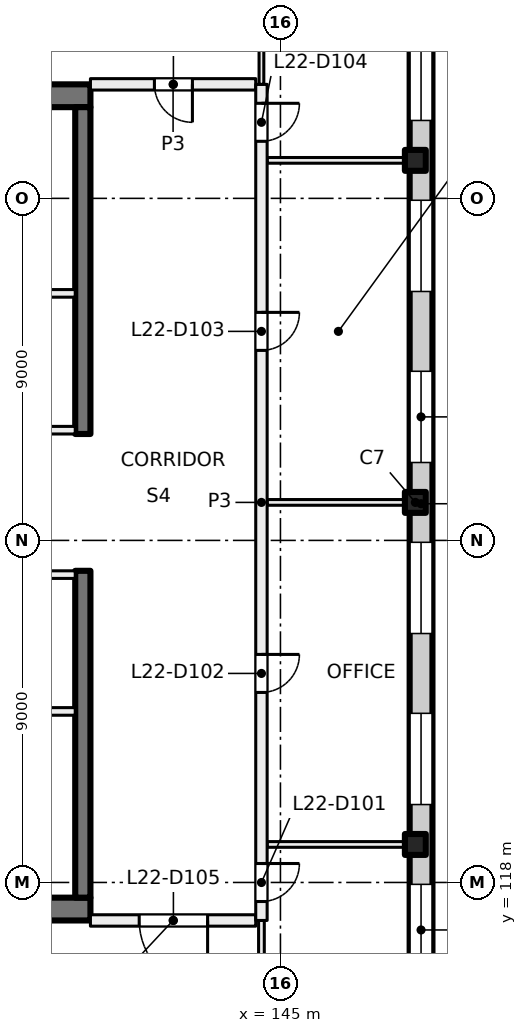
"""IFC4 building model, lengths in metres.
Left out: names, types, materials, properties, quantities, classifications, styles, units other than length and angle.
Written with IfcOpenShell. Run it as: python <this file> out.ifc"""

import sys

from ifc_helpers import new_model, si_unit, direction, frame, frame_2d, origin, origin_2d, place, context, subcontext, project, spatial, rectangle, extrude, element, fill, save


model = new_model("IFC4")
c1 = context("Model", 3, precision=1e-05, world=origin(), true_north=direction((0.0, 1.0)))
c2 = subcontext(c1, "Body", "Model", "MODEL_VIEW")
j1 = project(units=[si_unit("LENGTHUNIT", "METRE"), si_unit("PLANEANGLEUNIT", "RADIAN")], contexts=[c1])
p1 = place(None, origin())
s1 = spatial("IfcSite", under=j1, at=p1, CompositionType="ELEMENT")
p2 = place(p1, origin())
s2 = spatial("IfcBuilding", under=s1, at=p2, CompositionType="ELEMENT")
p3 = place(p2, frame((0.0, 0.0, 97.0)))
s3 = spatial("IfcBuildingStorey", under=s2, at=p3, CompositionType="ELEMENT", Elevation=97.0)
for number, where, z_axis, x_axis in (
    (1, (148.55, 119.0, 0.0), (0.0, 0.0, 1.0), (1.0, 0.0, 0.0)),
    (2, (148.55, 128.0, 0.0), (0.0, 0.0, 1.0), (1.0, 0.0, 0.0)),
    (3, (148.55, 137.0, 0.0), (0.0, 0.0, 1.0), (1.0, 0.0, 0.0)),
):
    element("IfcColumn", number, at=place(p3, frame(where, z_axis=z_axis, x_axis=x_axis)), inside=s3, PredefinedType="COLUMN", context=c2, shape_type="SweptSolid", body=[
        extrude(rectangle(XDim=0.55, YDim=0.55, at=origin_2d()), origin(), (0.0, 0.0, 1.0), 4.0),
    ])
for number, where, z_axis, x_axis in (
    (4, (135.4, 117.3, 0.0), (0.0, 0.0, 1.0), (1.0, 0.0, 0.0)),
    (5, (135.4, 138.7, 0.0), (0.0, 0.0, 1.0), (1.0, 0.0, 0.0)),
):
    element("IfcWall", number, at=place(p3, frame(where, z_axis=z_axis, x_axis=x_axis)), inside=s3, PredefinedType="SHEAR", context=c2, shape_type="SweptSolid", body=[
        extrude(rectangle(XDim=4.6, YDim=0.6, at=frame_2d((2.3, 0.0))), origin(), (0.0, 0.0, 1.0), 4.0),
    ])
for number, where, z_axis, x_axis in (
    (6, (139.8, 117.6, 0.0), (0.0, 0.0, 1.0), (0.0, 1.0, 0.0)),
    (7, (139.8, 129.8, 0.0), (0.0, 0.0, 1.0), (0.0, 1.0, 0.0)),
):
    element("IfcWall", number, at=place(p3, frame(where, z_axis=z_axis, x_axis=x_axis)), inside=s3, PredefinedType="SHEAR", context=c2, shape_type="SweptSolid", body=[
        extrude(rectangle(XDim=8.6, YDim=0.4, at=frame_2d((4.3, 0.0))), origin(), (0.0, 0.0, 1.0), 4.0),
    ])
p4 = place(p3, frame((148.7, 141.93, 0.0), z_axis=(0.0, 0.0, 1.0), x_axis=(0.0, -1.0, 0.0)))
e8 = element("IfcWall", 8, at=p4, inside=s3, PredefinedType="SOLIDWALL", context=c2, shape_type="SweptSolid", body=[
    extrude(rectangle(XDim=27.93, YDim=0.6, at=frame_2d((13.965, 0.0))), origin(), (0.0, 0.0, 1.0), 3.625),
])
p5 = place(p4, frame((1.48, 0.0, 0.9)))
e9 = element("IfcOpeningElement", 9, at=p5, cuts=e8, PredefinedType="OPENING", context=c2, shape_type="SweptSolid", body=[
    extrude(rectangle(XDim=2.4, YDim=2.4, at=frame_2d((1.2, 1.2))), frame((0.0, 0.31, 0.0), z_axis=(0.0, -1.0, 0.0), x_axis=(1.0, 0.0, 0.0)), (0.0, 0.0, 1.0), 0.62),
])
p6 = place(p4, frame((5.98, 0.0, 0.9)))
e10 = element("IfcOpeningElement", 10, at=p6, cuts=e8, PredefinedType="OPENING", context=c2, shape_type="SweptSolid", body=[
    extrude(rectangle(XDim=2.4, YDim=2.4, at=frame_2d((1.2, 1.2))), frame((0.0, 0.31, 0.0), z_axis=(0.0, -1.0, 0.0), x_axis=(1.0, 0.0, 0.0)), (0.0, 0.0, 1.0), 0.62),
])
p7 = place(p4, frame((10.48, 0.0, 0.9)))
e11 = element("IfcOpeningElement", 11, at=p7, cuts=e8, PredefinedType="OPENING", context=c2, shape_type="SweptSolid", body=[
    extrude(rectangle(XDim=2.4, YDim=2.4, at=frame_2d((1.2, 1.2))), frame((0.0, 0.31, 0.0), z_axis=(0.0, -1.0, 0.0), x_axis=(1.0, 0.0, 0.0)), (0.0, 0.0, 1.0), 0.62),
])
p8 = place(p4, frame((14.98, 0.0, 0.9)))
e12 = element("IfcOpeningElement", 12, at=p8, cuts=e8, PredefinedType="OPENING", context=c2, shape_type="SweptSolid", body=[
    extrude(rectangle(XDim=2.4, YDim=2.4, at=frame_2d((1.2, 1.2))), frame((0.0, 0.31, 0.0), z_axis=(0.0, -1.0, 0.0), x_axis=(1.0, 0.0, 0.0)), (0.0, 0.0, 1.0), 0.62),
])
p9 = place(p4, frame((19.48, 0.0, 0.9)))
e13 = element("IfcOpeningElement", 13, at=p9, cuts=e8, PredefinedType="OPENING", context=c2, shape_type="SweptSolid", body=[
    extrude(rectangle(XDim=2.4, YDim=2.4, at=frame_2d((1.2, 1.2))), frame((0.0, 0.31, 0.0), z_axis=(0.0, -1.0, 0.0), x_axis=(1.0, 0.0, 0.0)), (0.0, 0.0, 1.0), 0.62),
])
p10 = place(p4, frame((23.98, 0.0, 0.9)))
e14 = element("IfcOpeningElement", 14, at=p10, cuts=e8, PredefinedType="OPENING", context=c2, shape_type="SweptSolid", body=[
    extrude(rectangle(XDim=2.4, YDim=2.4, at=frame_2d((1.2, 1.2))), frame((0.0, 0.31, 0.0), z_axis=(0.0, -1.0, 0.0), x_axis=(1.0, 0.0, 0.0)), (0.0, 0.0, 1.0), 0.62),
])
p11 = place(p3, frame((135.0, 129.9, 0.0), z_axis=(0.0, 0.0, 1.0), x_axis=(1.0, 0.0, 0.0)))
e15 = element("IfcWall", 15, at=p11, inside=s3, PredefinedType="PARTITIONING", context=c2, shape_type="SweptSolid", body=[
    extrude(rectangle(XDim=4.6, YDim=0.2, at=frame_2d((2.3, 0.0))), origin(), (0.0, 0.0, 1.0), 3.625),
])
p12 = place(p11, frame((1.7, 0.0, 0.0)))
e16 = element("IfcOpeningElement", 16, at=p12, cuts=e15, PredefinedType="OPENING", context=c2, shape_type="SweptSolid", body=[
    extrude(rectangle(XDim=1.2, YDim=2.1, at=frame_2d((0.6, 1.05))), frame((0.0, 0.11, 0.0), z_axis=(0.0, -1.0, 0.0), x_axis=(1.0, 0.0, 0.0)), (0.0, 0.0, 1.0), 0.22),
])
p13 = place(p3, frame((135.0, 133.5, 0.0), z_axis=(0.0, 0.0, 1.0), x_axis=(1.0, 0.0, 0.0)))
e17 = element("IfcWall", 17, at=p13, inside=s3, PredefinedType="PARTITIONING", context=c2, shape_type="SweptSolid", body=[
    extrude(rectangle(XDim=4.6, YDim=0.2, at=frame_2d((2.3, 0.0))), origin(), (0.0, 0.0, 1.0), 3.625),
])
p14 = place(p13, frame((1.75, 0.0, 0.0)))
e18 = element("IfcOpeningElement", 18, at=p14, cuts=e17, PredefinedType="OPENING", context=c2, shape_type="SweptSolid", body=[
    extrude(rectangle(XDim=1.5, YDim=2.1, at=frame_2d((0.75, 1.05))), frame((0.0, 0.11, 0.0), z_axis=(0.0, -1.0, 0.0), x_axis=(1.0, 0.0, 0.0)), (0.0, 0.0, 1.0), 0.22),
])
p15 = place(p3, frame((139.6, 126.1, 0.0), z_axis=(0.0, 0.0, 1.0), x_axis=(-1.0, 0.0, 0.0)))
e19 = element("IfcWall", 19, at=p15, inside=s3, PredefinedType="PARTITIONING", context=c2, shape_type="SweptSolid", body=[
    extrude(rectangle(XDim=4.6, YDim=0.2, at=frame_2d((2.3, 0.0))), origin(), (0.0, 0.0, 1.0), 3.625),
])
p16 = place(p15, frame((1.7, 0.0, 0.0)))
e20 = element("IfcOpeningElement", 20, at=p16, cuts=e19, PredefinedType="OPENING", context=c2, shape_type="SweptSolid", body=[
    extrude(rectangle(XDim=1.2, YDim=2.1, at=frame_2d((0.6, 1.05))), frame((0.0, 0.11, 0.0), z_axis=(0.0, -1.0, 0.0), x_axis=(1.0, 0.0, 0.0)), (0.0, 0.0, 1.0), 0.22),
])
p17 = place(p3, frame((139.6, 122.5, 0.0), z_axis=(0.0, 0.0, 1.0), x_axis=(-1.0, 0.0, 0.0)))
e21 = element("IfcWall", 21, at=p17, inside=s3, PredefinedType="PARTITIONING", context=c2, shape_type="SweptSolid", body=[
    extrude(rectangle(XDim=4.6, YDim=0.2, at=frame_2d((2.3, 0.0))), origin(), (0.0, 0.0, 1.0), 3.625),
])
p18 = place(p17, frame((1.35, 0.0, 0.0)))
e22 = element("IfcOpeningElement", 22, at=p18, cuts=e21, PredefinedType="OPENING", context=c2, shape_type="SweptSolid", body=[
    extrude(rectangle(XDim=1.5, YDim=2.1, at=frame_2d((0.75, 1.05))), frame((0.0, 0.11, 0.0), z_axis=(0.0, -1.0, 0.0), x_axis=(1.0, 0.0, 0.0)), (0.0, 0.0, 1.0), 0.22),
])
p19 = place(p3, frame((144.35, 139.0, 0.0), z_axis=(0.0, 0.0, 1.0), x_axis=(-1.0, 0.0, 0.0)))
e23 = element("IfcWall", 23, at=p19, inside=s3, PredefinedType="PARTITIONING", context=c2, shape_type="SweptSolid", body=[
    extrude(rectangle(XDim=4.35, YDim=0.3, at=frame_2d((2.175, 0.0))), origin(), (0.0, 0.0, 1.0), 3.625),
])
p20 = place(p19, frame((1.667, 0.0, 0.0)))
e24 = element("IfcOpeningElement", 24, at=p20, cuts=e23, PredefinedType="OPENING", context=c2, shape_type="SweptSolid", body=[
    extrude(rectangle(XDim=1.0, YDim=2.1, at=frame_2d((0.5, 1.05))), frame((0.0, 0.16, 0.0), z_axis=(0.0, -1.0, 0.0), x_axis=(1.0, 0.0, 0.0)), (0.0, 0.0, 1.0), 0.32),
])
p21 = place(p3, frame((144.35, 117.0, 0.0), z_axis=(0.0, 0.0, 1.0), x_axis=(-1.0, 0.0, 0.0)))
e25 = element("IfcWall", 25, at=p21, inside=s3, PredefinedType="PARTITIONING", context=c2, shape_type="SweptSolid", body=[
    extrude(rectangle(XDim=4.35, YDim=0.3, at=frame_2d((2.175, 0.0))), origin(), (0.0, 0.0, 1.0), 3.625),
])
p22 = place(p21, frame((1.267, 0.0, 0.0)))
e26 = element("IfcOpeningElement", 26, at=p22, cuts=e25, PredefinedType="OPENING", context=c2, shape_type="SweptSolid", body=[
    extrude(rectangle(XDim=1.8, YDim=2.1, at=frame_2d((0.9, 1.05))), frame((0.0, 0.16, 0.0), z_axis=(0.0, -1.0, 0.0), x_axis=(1.0, 0.0, 0.0)), (0.0, 0.0, 1.0), 0.32),
])
p23 = place(p3, frame((144.5, 117.0, 0.0), z_axis=(0.0, 0.0, 1.0), x_axis=(0.0, -1.0, 0.0)))
e27 = element("IfcWall", 27, at=p23, inside=s3, PredefinedType="PARTITIONING", context=c2, shape_type="SweptSolid", body=[
    extrude(rectangle(XDim=6.4, YDim=0.15, at=frame_2d((3.2, 0.0))), origin(), (0.0, 0.0, 1.0), 3.625),
])
for number, where, z_axis, x_axis in (
    (28, (144.65, 119.0, 0.0), (0.0, 0.0, 1.0), (1.0, 0.0, 0.0)),
    (29, (144.65, 128.0, 0.0), (0.0, 0.0, 1.0), (1.0, 0.0, 0.0)),
    (30, (144.65, 137.0, 0.0), (0.0, 0.0, 1.0), (1.0, 0.0, 0.0)),
):
    element("IfcWall", number, at=place(p3, frame(where, z_axis=z_axis, x_axis=x_axis)), inside=s3, PredefinedType="PARTITIONING", context=c2, shape_type="SweptSolid", body=[
        extrude(rectangle(XDim=3.75, YDim=0.15, at=frame_2d((1.875, 0.0))), origin(), (0.0, 0.0, 1.0), 3.625),
    ])
p24 = place(p3, frame((144.5, 139.0, 0.0), z_axis=(0.0, 0.0, 1.0), x_axis=(0.0, -1.0, 0.0)))
e31 = element("IfcWall", 31, at=p24, inside=s3, PredefinedType="PARTITIONING", context=c2, shape_type="SweptSolid", body=[
    extrude(rectangle(XDim=22.0, YDim=0.3, at=frame_2d((11.0, 0.0))), origin(), (0.0, 0.0, 1.0), 3.625),
])
p25 = place(p24, frame((20.501, 0.0, 0.0)))
e32 = element("IfcOpeningElement", 32, at=p25, cuts=e31, PredefinedType="OPENING", context=c2, shape_type="SweptSolid", body=[
    extrude(rectangle(XDim=1.0, YDim=2.1, at=frame_2d((0.5, 1.05))), frame((0.0, 0.16, 0.0), z_axis=(0.0, -1.0, 0.0), x_axis=(1.0, 0.0, 0.0)), (0.0, 0.0, 1.0), 0.32),
])
p26 = place(p24, frame((15.0, 0.0, 0.0)))
e33 = element("IfcOpeningElement", 33, at=p26, cuts=e31, PredefinedType="OPENING", context=c2, shape_type="SweptSolid", body=[
    extrude(rectangle(XDim=1.0, YDim=2.1, at=frame_2d((0.5, 1.05))), frame((0.0, 0.16, 0.0), z_axis=(0.0, -1.0, 0.0), x_axis=(1.0, 0.0, 0.0)), (0.0, 0.0, 1.0), 0.32),
])
p27 = place(p24, frame((6.0, 0.0, 0.0)))
e34 = element("IfcOpeningElement", 34, at=p27, cuts=e31, PredefinedType="OPENING", context=c2, shape_type="SweptSolid", body=[
    extrude(rectangle(XDim=1.0, YDim=2.1, at=frame_2d((0.5, 1.05))), frame((0.0, 0.16, 0.0), z_axis=(0.0, -1.0, 0.0), x_axis=(1.0, 0.0, 0.0)), (0.0, 0.0, 1.0), 0.32),
])
p28 = place(p24, frame((0.499, 0.0, 0.0)))
e35 = element("IfcOpeningElement", 35, at=p28, cuts=e31, PredefinedType="OPENING", context=c2, shape_type="SweptSolid", body=[
    extrude(rectangle(XDim=1.0, YDim=2.1, at=frame_2d((0.5, 1.05))), frame((0.0, 0.16, 0.0), z_axis=(0.0, -1.0, 0.0), x_axis=(1.0, 0.0, 0.0)), (0.0, 0.0, 1.0), 0.32),
])
p29 = place(p3, frame((144.5, 141.8, 0.0), z_axis=(0.0, 0.0, 1.0), x_axis=(0.0, -1.0, 0.0)))
e36 = element("IfcWall", 36, at=p29, inside=s3, PredefinedType="PARTITIONING", context=c2, shape_type="SweptSolid", body=[
    extrude(rectangle(XDim=2.8, YDim=0.125, at=frame_2d((1.4, 0.0))), origin(), (0.0, 0.0, 1.0), 3.625),
])
p30 = place(p5, origin())
e37 = element("IfcWindow", 37, at=p30, inside=s3, PartitioningType="SINGLE_PANEL", PredefinedType="WINDOW", context=c2, shape_type="SweptSolid", body=[
    extrude(rectangle(XDim=2.4, YDim=2.4, at=frame_2d((1.2, 1.2))), frame((0.0, 0.03, 0.0), z_axis=(0.0, -1.0, 0.0), x_axis=(1.0, 0.0, 0.0)), (0.0, 0.0, 1.0), 0.06),
])
fill(e9, e37)
p31 = place(p6, origin())
e38 = element("IfcWindow", 38, at=p31, inside=s3, PartitioningType="SINGLE_PANEL", PredefinedType="WINDOW", context=c2, shape_type="SweptSolid", body=[
    extrude(rectangle(XDim=2.4, YDim=2.4, at=frame_2d((1.2, 1.2))), frame((0.0, 0.03, 0.0), z_axis=(0.0, -1.0, 0.0), x_axis=(1.0, 0.0, 0.0)), (0.0, 0.0, 1.0), 0.06),
])
fill(e10, e38)
p32 = place(p7, origin())
e39 = element("IfcWindow", 39, at=p32, inside=s3, PartitioningType="SINGLE_PANEL", PredefinedType="WINDOW", context=c2, shape_type="SweptSolid", body=[
    extrude(rectangle(XDim=2.4, YDim=2.4, at=frame_2d((1.2, 1.2))), frame((0.0, 0.03, 0.0), z_axis=(0.0, -1.0, 0.0), x_axis=(1.0, 0.0, 0.0)), (0.0, 0.0, 1.0), 0.06),
])
fill(e11, e39)
p33 = place(p8, origin())
e40 = element("IfcWindow", 40, at=p33, inside=s3, PartitioningType="SINGLE_PANEL", PredefinedType="WINDOW", context=c2, shape_type="SweptSolid", body=[
    extrude(rectangle(XDim=2.4, YDim=2.4, at=frame_2d((1.2, 1.2))), frame((0.0, 0.03, 0.0), z_axis=(0.0, -1.0, 0.0), x_axis=(1.0, 0.0, 0.0)), (0.0, 0.0, 1.0), 0.06),
])
fill(e12, e40)
p34 = place(p9, origin())
e41 = element("IfcWindow", 41, at=p34, inside=s3, PartitioningType="SINGLE_PANEL", PredefinedType="WINDOW", context=c2, shape_type="SweptSolid", body=[
    extrude(rectangle(XDim=2.4, YDim=2.4, at=frame_2d((1.2, 1.2))), frame((0.0, 0.03, 0.0), z_axis=(0.0, -1.0, 0.0), x_axis=(1.0, 0.0, 0.0)), (0.0, 0.0, 1.0), 0.06),
])
fill(e13, e41)
p35 = place(p10, origin())
e42 = element("IfcWindow", 42, at=p35, inside=s3, PartitioningType="SINGLE_PANEL", PredefinedType="WINDOW", context=c2, shape_type="SweptSolid", body=[
    extrude(rectangle(XDim=2.4, YDim=2.4, at=frame_2d((1.2, 1.2))), frame((0.0, 0.03, 0.0), z_axis=(0.0, -1.0, 0.0), x_axis=(1.0, 0.0, 0.0)), (0.0, 0.0, 1.0), 0.06),
])
fill(e14, e42)
p36 = place(p25, origin())
e43 = element("IfcDoor", 43, at=p36, inside=s3, OperationType="SINGLE_SWING_LEFT", PredefinedType="DOOR", context=c2, shape_type="SweptSolid", body=[
    extrude(rectangle(XDim=1.0, YDim=2.1, at=frame_2d((0.5, 1.05))), frame((0.0, 0.025, 0.0), z_axis=(0.0, -1.0, 0.0), x_axis=(1.0, 0.0, 0.0)), (0.0, 0.0, 1.0), 0.05),
])
fill(e32, e43)
p37 = place(p26, origin())
e44 = element("IfcDoor", 44, at=p37, inside=s3, OperationType="SINGLE_SWING_LEFT", PredefinedType="DOOR", context=c2, shape_type="SweptSolid", body=[
    extrude(rectangle(XDim=1.0, YDim=2.1, at=frame_2d((0.5, 1.05))), frame((0.0, 0.025, 0.0), z_axis=(0.0, -1.0, 0.0), x_axis=(1.0, 0.0, 0.0)), (0.0, 0.0, 1.0), 0.05),
])
fill(e33, e44)
p38 = place(p27, origin())
e45 = element("IfcDoor", 45, at=p38, inside=s3, OperationType="SINGLE_SWING_LEFT", PredefinedType="DOOR", context=c2, shape_type="SweptSolid", body=[
    extrude(rectangle(XDim=1.0, YDim=2.1, at=frame_2d((0.5, 1.05))), frame((0.0, 0.025, 0.0), z_axis=(0.0, -1.0, 0.0), x_axis=(1.0, 0.0, 0.0)), (0.0, 0.0, 1.0), 0.05),
])
fill(e34, e45)
p39 = place(p28, origin())
e46 = element("IfcDoor", 46, at=p39, inside=s3, OperationType="SINGLE_SWING_LEFT", PredefinedType="DOOR", context=c2, shape_type="SweptSolid", body=[
    extrude(rectangle(XDim=1.0, YDim=2.1, at=frame_2d((0.5, 1.05))), frame((0.0, 0.025, 0.0), z_axis=(0.0, -1.0, 0.0), x_axis=(1.0, 0.0, 0.0)), (0.0, 0.0, 1.0), 0.05),
])
fill(e35, e46)
p40 = place(p22, origin())
e47 = element("IfcDoor", 47, at=p40, inside=s3, OperationType="DOUBLE_DOOR_SINGLE_SWING", PredefinedType="DOOR", context=c2, shape_type="SweptSolid", body=[
    extrude(rectangle(XDim=1.8, YDim=2.1, at=frame_2d((0.9, 1.05))), frame((0.0, 0.025, 0.0), z_axis=(0.0, -1.0, 0.0), x_axis=(1.0, 0.0, 0.0)), (0.0, 0.0, 1.0), 0.05),
])
fill(e26, e47)
p41 = place(p20, origin())
e48 = element("IfcDoor", 48, at=p41, inside=s3, OperationType="SINGLE_SWING_LEFT", PredefinedType="DOOR", context=c2, shape_type="SweptSolid", body=[
    extrude(rectangle(XDim=1.0, YDim=2.1, at=frame_2d((0.5, 1.05))), frame((0.0, 0.025, 0.0), z_axis=(0.0, -1.0, 0.0), x_axis=(1.0, 0.0, 0.0)), (0.0, 0.0, 1.0), 0.05),
])
fill(e24, e48)
save(model, sys.argv[1])
